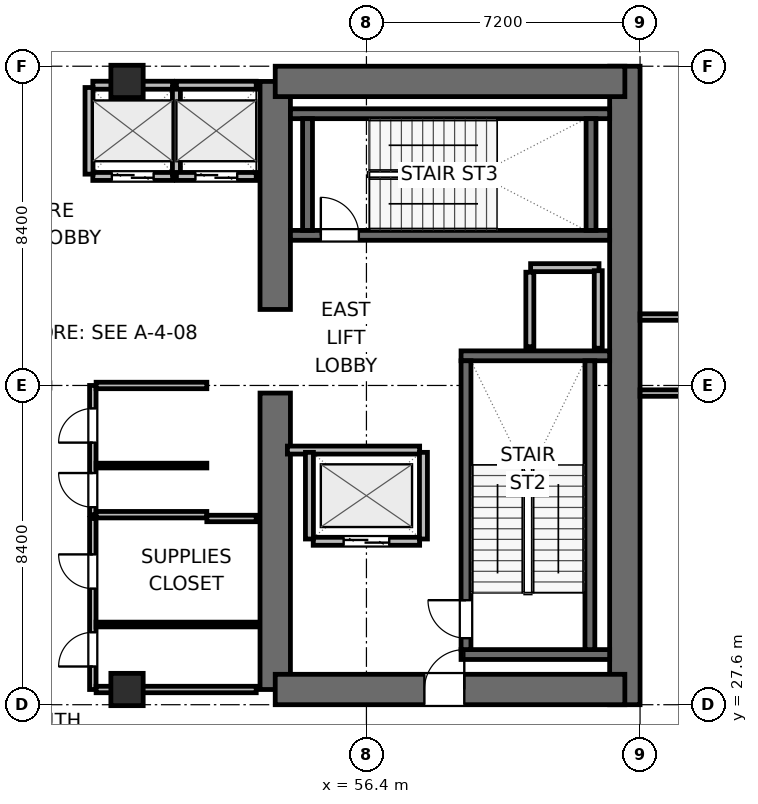
"""IFC4 building model, lengths in metres.
Left out: names, types, materials, properties, quantities, classifications, styles, units other than length and angle.
Written with IfcOpenShell. Run it as: python <this file> out.ifc"""

import sys

from ifc_helpers import new_model, si_unit, direction, frame, frame_2d, origin, origin_2d, place, context, subcontext, project, spatial, rectangle, extrude, element, fill, save


model = new_model("IFC4")
c1 = context("Model", 3, precision=1e-05, world=origin(), true_north=direction((0.0, 1.0)))
c2 = subcontext(c1, "Body", "Model", "MODEL_VIEW")
j1 = project(units=[si_unit("LENGTHUNIT", "METRE"), si_unit("PLANEANGLEUNIT", "RADIAN")], contexts=[c1])
p1 = place(None, origin())
s1 = spatial("IfcSite", under=j1, at=p1, CompositionType="ELEMENT")
p2 = place(p1, origin())
s2 = spatial("IfcBuilding", under=s1, at=p2, CompositionType="ELEMENT")
p3 = place(p2, frame((0.0, 0.0, 125.4)))
s3 = spatial("IfcBuildingStorey", under=s2, at=p3, CompositionType="ELEMENT", Elevation=125.4)
p4 = place(p3, frame((54.0, 28.0, 0.0), z_axis=(0.0, 0.0, 1.0), x_axis=(0.0, 1.0, 0.0)))
e1 = element("IfcWall", 1, at=p4, inside=s3, PredefinedType="SHEAR", context=c2, shape_type="SweptSolid", body=[
    extrude(rectangle(XDim=7.8, YDim=0.8, at=frame_2d((3.9, 0.0))), origin(), (0.0, 0.0, 1.0), 4.5),
])
p5 = place(p3, frame((54.0, 38.0, 0.0), z_axis=(0.0, 0.0, 1.0), x_axis=(0.0, 1.0, 0.0)))
e2 = element("IfcWall", 2, at=p5, inside=s3, PredefinedType="SHEAR", context=c2, shape_type="SweptSolid", body=[
    extrude(rectangle(XDim=6.0, YDim=0.8, at=frame_2d((3.0, 0.0))), origin(), (0.0, 0.0, 1.0), 4.5),
])
p6 = place(p3, frame((63.2, 27.6, 0.0), z_axis=(0.0, 0.0, 1.0), x_axis=(0.0, 1.0, 0.0)))
e3 = element("IfcWall", 3, at=p6, inside=s3, PredefinedType="SHEAR", context=c2, shape_type="SweptSolid", body=[
    extrude(rectangle(XDim=16.8, YDim=0.8, at=frame_2d((8.4, 0.0))), origin(), (0.0, 0.0, 1.0), 4.5),
])
p7 = place(p3, frame((54.0, 28.0, 0.0), z_axis=(0.0, 0.0, 1.0), x_axis=(1.0, 0.0, 0.0)))
e4 = element("IfcWall", 4, at=p7, inside=s3, PredefinedType="SHEAR", context=c2, shape_type="SweptSolid", body=[
    extrude(rectangle(XDim=9.2, YDim=0.8, at=frame_2d((4.6, 0.0))), origin(), (0.0, 0.0, 1.0), 4.5),
])
p8 = place(p7, frame((3.925, 0.0, 0.0)))
e5 = element("IfcOpeningElement", 5, at=p8, cuts=e4, PredefinedType="OPENING", context=c2, shape_type="SweptSolid", body=[
    extrude(rectangle(XDim=1.05, YDim=2.04, at=frame_2d((0.525, 1.02))), frame((0.0, 0.41, 0.0), z_axis=(0.0, -1.0, 0.0), x_axis=(1.0, 0.0, 0.0)), (0.0, 0.0, 1.0), 0.82),
])
p9 = place(p3, frame((54.0, 44.0, 0.0), z_axis=(0.0, 0.0, 1.0), x_axis=(1.0, 0.0, 0.0)))
e6 = element("IfcWall", 6, at=p9, inside=s3, PredefinedType="SHEAR", context=c2, shape_type="SweptSolid", body=[
    extrude(rectangle(XDim=9.2, YDim=0.8, at=frame_2d((4.6, 0.0))), origin(), (0.0, 0.0, 1.0), 4.5),
])
for number, where, z_axis, x_axis in (
    (7, (58.89, 28.92, 0.0), (0.0, 0.0, 1.0), (1.0, 0.0, 0.0)),
    (8, (58.89, 36.78, 0.0), (0.0, 0.0, 1.0), (1.0, 0.0, 0.0)),
):
    element("IfcWall", number, at=place(p3, frame(where, z_axis=z_axis, x_axis=x_axis)), inside=s3, PredefinedType="SHEAR", context=c2, shape_type="SweptSolid", body=[
        extrude(rectangle(XDim=3.91, YDim=0.26, at=frame_2d((1.955, 0.0))), origin(), (0.0, 0.0, 1.0), 4.5),
    ])
p10 = place(p3, frame((59.02, 29.05, 0.0), z_axis=(0.0, 0.0, 1.0), x_axis=(0.0, 1.0, 0.0)))
e9 = element("IfcWall", 9, at=p10, inside=s3, PredefinedType="SHEAR", context=c2, shape_type="SweptSolid", body=[
    extrude(rectangle(XDim=7.6, YDim=0.26, at=frame_2d((3.8, 0.0))), origin(), (0.0, 0.0, 1.0), 4.5),
])
p11 = place(p10, frame((0.3, 0.0, 0.0)))
e10 = element("IfcOpeningElement", 10, at=p11, cuts=e9, PredefinedType="OPENING", context=c2, shape_type="SweptSolid", body=[
    extrude(rectangle(XDim=1.0, YDim=2.04, at=frame_2d((0.5, 1.02))), frame((0.0, 0.14, 0.0), z_axis=(0.0, -1.0, 0.0), x_axis=(1.0, 0.0, 0.0)), (0.0, 0.0, 1.0), 0.28),
])
p12 = place(p3, frame((62.28, 29.05, 0.0), z_axis=(0.0, 0.0, 1.0), x_axis=(0.0, 1.0, 0.0)))
e11 = element("IfcWall", 11, at=p12, inside=s3, PredefinedType="SHEAR", context=c2, shape_type="SweptSolid", body=[
    extrude(rectangle(XDim=7.6, YDim=0.26, at=frame_2d((3.8, 0.0))), origin(), (0.0, 0.0, 1.0), 4.5),
])
p13 = place(p3, frame((54.4, 39.95, 0.0), z_axis=(0.0, 0.0, 1.0), x_axis=(1.0, 0.0, 0.0)))
e12 = element("IfcWall", 12, at=p13, inside=s3, PredefinedType="SHEAR", context=c2, shape_type="SweptSolid", body=[
    extrude(rectangle(XDim=8.4, YDim=0.26, at=frame_2d((4.2, 0.0))), origin(), (0.0, 0.0, 1.0), 4.5),
])
p14 = place(p13, frame((0.8, 0.0, 0.0)))
e13 = element("IfcOpeningElement", 13, at=p14, cuts=e12, PredefinedType="OPENING", context=c2, shape_type="SweptSolid", body=[
    extrude(rectangle(XDim=1.0, YDim=2.04, at=frame_2d((0.5, 1.02))), frame((0.0, 0.14, 0.0), z_axis=(0.0, -1.0, 0.0), x_axis=(1.0, 0.0, 0.0)), (0.0, 0.0, 1.0), 0.28),
])
p15 = place(p3, frame((54.4, 43.15, 0.0), z_axis=(0.0, 0.0, 1.0), x_axis=(1.0, 0.0, 0.0)))
e14 = element("IfcWall", 14, at=p15, inside=s3, PredefinedType="SHEAR", context=c2, shape_type="SweptSolid", body=[
    extrude(rectangle(XDim=8.4, YDim=0.26, at=frame_2d((4.2, 0.0))), origin(), (0.0, 0.0, 1.0), 4.5),
])
for number, where, z_axis, x_axis in (
    (15, (54.85, 40.08, 0.0), (0.0, 0.0, 1.0), (0.0, 1.0, 0.0)),
    (16, (62.31, 40.08, 0.0), (0.0, 0.0, 1.0), (0.0, 1.0, 0.0)),
):
    element("IfcWall", number, at=place(p3, frame(where, z_axis=z_axis, x_axis=x_axis)), inside=s3, PredefinedType="SHEAR", context=c2, shape_type="SweptSolid", body=[
        extrude(rectangle(XDim=2.94, YDim=0.26, at=frame_2d((1.47, 0.0))), origin(), (0.0, 0.0, 1.0), 4.5),
    ])
for number, where, z_axis, x_axis in (
    (17, (50.1, 28.0, 0.0), (0.0, 0.0, 1.0), (1.0, 0.0, 0.0)),
    (18, (50.1, 44.0, 0.0), (0.0, 0.0, 1.0), (1.0, 0.0, 0.0)),
):
    element("IfcColumn", number, at=place(p3, frame(where, z_axis=z_axis, x_axis=x_axis)), inside=s3, PredefinedType="COLUMN", context=c2, shape_type="SweptSolid", body=[
        extrude(rectangle(XDim=0.85, YDim=0.85, at=origin_2d()), origin(), (0.0, 0.0, 1.0), 4.5),
    ])
p16 = place(p3, frame((60.72, 39.1, 0.0), z_axis=(0.0, 0.0, 1.0), x_axis=(1.0, 0.0, 0.0)))
e19 = element("IfcWall", 19, at=p16, inside=s3, PredefinedType="PARTITIONING", context=c2, shape_type="SweptSolid", body=[
    extrude(rectangle(XDim=1.8, YDim=0.21, at=frame_2d((0.9, 0.0))), origin(), (0.0, 0.0, 1.0), 4.24),
])
p17 = place(p3, frame((60.7, 37.02, 0.0), z_axis=(0.0, 0.0, 1.0), x_axis=(0.0, 1.0, 0.0)))
e20 = element("IfcWall", 20, at=p17, inside=s3, PredefinedType="PARTITIONING", context=c2, shape_type="SweptSolid", body=[
    extrude(rectangle(XDim=1.96, YDim=0.21, at=frame_2d((0.98, 0.0))), origin(), (0.0, 0.0, 1.0), 4.24),
])
p18 = place(p3, frame((62.5, 36.98, 0.0), z_axis=(0.0, 0.0, 1.0), x_axis=(0.0, 1.0, 0.0)))
e21 = element("IfcWall", 21, at=p18, inside=s3, PredefinedType="PARTITIONING", context=c2, shape_type="SweptSolid", body=[
    extrude(rectangle(XDim=2.04, YDim=0.21, at=frame_2d((1.02, 0.0))), origin(), (0.0, 0.0, 1.0), 4.24),
])
p19 = place(p3, frame((55.0, 31.9, 0.0), z_axis=(0.0, 0.0, 1.0), x_axis=(1.0, 0.0, 0.0)))
e22 = element("IfcWall", 22, at=p19, inside=s3, PredefinedType="PARTITIONING", context=c2, shape_type="SweptSolid", body=[
    extrude(rectangle(XDim=2.8, YDim=0.21, at=frame_2d((1.4, 0.0))), origin(), (0.0, 0.0, 1.0), 4.24),
])
p20 = place(p19, frame((0.8, 0.0, 0.0)))
e23 = element("IfcOpeningElement", 23, at=p20, cuts=e22, PredefinedType="OPENING", context=c2, shape_type="SweptSolid", body=[
    extrude(rectangle(XDim=1.2, YDim=2.04, at=frame_2d((0.6, 1.02))), frame((0.0, 0.115, 0.0), z_axis=(0.0, -1.0, 0.0), x_axis=(1.0, 0.0, 0.0)), (0.0, 0.0, 1.0), 0.23),
])
p21 = place(p3, frame((54.32, 34.3, 0.0), z_axis=(0.0, 0.0, 1.0), x_axis=(1.0, 0.0, 0.0)))
e24 = element("IfcWall", 24, at=p21, inside=s3, PredefinedType="PARTITIONING", context=c2, shape_type="SweptSolid", body=[
    extrude(rectangle(XDim=3.48, YDim=0.21, at=frame_2d((1.74, 0.0))), origin(), (0.0, 0.0, 1.0), 4.24),
])
for number, where, z_axis, x_axis in (
    (25, (54.9, 31.96, 0.0), (0.0, 0.0, 1.0), (0.0, 1.0, 0.0)),
    (26, (57.9, 31.96, 0.0), (0.0, 0.0, 1.0), (0.0, 1.0, 0.0)),
):
    element("IfcWall", number, at=place(p3, frame(where, z_axis=z_axis, x_axis=x_axis)), inside=s3, PredefinedType="PARTITIONING", context=c2, shape_type="SweptSolid", body=[
        extrude(rectangle(XDim=2.28, YDim=0.21, at=frame_2d((1.14, 0.0))), origin(), (0.0, 0.0, 1.0), 4.24),
    ])
p22 = place(p3, frame((49.2, 41.5, 0.0), z_axis=(0.0, 0.0, 1.0), x_axis=(1.0, 0.0, 0.0)))
e27 = element("IfcWall", 27, at=p22, inside=s3, PredefinedType="PARTITIONING", context=c2, shape_type="SweptSolid", body=[
    extrude(rectangle(XDim=2.1, YDim=0.21, at=frame_2d((1.05, 0.0))), origin(), (0.0, 0.0, 1.0), 4.24),
])
p23 = place(p22, frame((0.5, 0.0, 0.0)))
e28 = element("IfcOpeningElement", 28, at=p23, cuts=e27, PredefinedType="OPENING", context=c2, shape_type="SweptSolid", body=[
    extrude(rectangle(XDim=1.1, YDim=2.04, at=frame_2d((0.55, 1.02))), frame((0.0, 0.115, 0.0), z_axis=(0.0, -1.0, 0.0), x_axis=(1.0, 0.0, 0.0)), (0.0, 0.0, 1.0), 0.23),
])
p24 = place(p3, frame((49.2, 43.9, 0.0), z_axis=(0.0, 0.0, 1.0), x_axis=(1.0, 0.0, 0.0)))
e29 = element("IfcWall", 29, at=p24, inside=s3, PredefinedType="PARTITIONING", context=c2, shape_type="SweptSolid", body=[
    extrude(rectangle(XDim=2.1, YDim=0.21, at=frame_2d((1.05, 0.0))), origin(), (0.0, 0.0, 1.0), 3.125),
])
for number, where, z_axis, x_axis in (
    (30, (49.1, 41.56, 0.0), (0.0, 0.0, 1.0), (0.0, 1.0, 0.0)),
    (31, (51.4, 41.56, 0.0), (0.0, 0.0, 1.0), (0.0, 1.0, 0.0)),
):
    element("IfcWall", number, at=place(p3, frame(where, z_axis=z_axis, x_axis=x_axis)), inside=s3, PredefinedType="PARTITIONING", context=c2, shape_type="SweptSolid", body=[
        extrude(rectangle(XDim=2.28, YDim=0.21, at=frame_2d((1.14, 0.0))), origin(), (0.0, 0.0, 1.0), 4.24),
    ])
p25 = place(p3, frame((51.4, 41.5, 0.0), z_axis=(0.0, 0.0, 1.0), x_axis=(1.0, 0.0, 0.0)))
e32 = element("IfcWall", 32, at=p25, inside=s3, PredefinedType="PARTITIONING", context=c2, shape_type="SweptSolid", body=[
    extrude(rectangle(XDim=2.1, YDim=0.21, at=frame_2d((1.05, 0.0))), origin(), (0.0, 0.0, 1.0), 4.24),
])
p26 = place(p25, frame((0.5, 0.0, 0.0)))
e33 = element("IfcOpeningElement", 33, at=p26, cuts=e32, PredefinedType="OPENING", context=c2, shape_type="SweptSolid", body=[
    extrude(rectangle(XDim=1.1, YDim=2.04, at=frame_2d((0.55, 1.02))), frame((0.0, 0.115, 0.0), z_axis=(0.0, -1.0, 0.0), x_axis=(1.0, 0.0, 0.0)), (0.0, 0.0, 1.0), 0.23),
])
p27 = place(p3, frame((51.4, 43.9, 0.0), z_axis=(0.0, 0.0, 1.0), x_axis=(1.0, 0.0, 0.0)))
e34 = element("IfcWall", 34, at=p27, inside=s3, PredefinedType="PARTITIONING", context=c2, shape_type="SweptSolid", body=[
    extrude(rectangle(XDim=2.1, YDim=0.21, at=frame_2d((1.05, 0.0))), origin(), (0.0, 0.0, 1.0), 3.125),
])
p28 = place(p3, frame((49.2, 32.6, 0.0), z_axis=(0.0, 0.0, 1.0), x_axis=(0.0, 1.0, 0.0)))
e35 = element("IfcWall", 35, at=p28, inside=s3, PredefinedType="PARTITIONING", context=c2, shape_type="SweptSolid", body=[
    extrude(rectangle(XDim=3.4, YDim=0.17, at=frame_2d((1.7, 0.0))), origin(), (0.0, 0.0, 1.0), 4.24),
])
p29 = place(p28, frame((0.196, 0.0, 0.0)))
e36 = element("IfcOpeningElement", 36, at=p29, cuts=e35, PredefinedType="OPENING", context=c2, shape_type="SweptSolid", body=[
    extrude(rectangle(XDim=0.9, YDim=2.02, at=frame_2d((0.45, 1.01))), frame((0.0, 0.095, 0.0), z_axis=(0.0, -1.0, 0.0), x_axis=(1.0, 0.0, 0.0)), (0.0, 0.0, 1.0), 0.19),
])
p30 = place(p28, frame((1.896, 0.0, 0.0)))
e37 = element("IfcOpeningElement", 37, at=p30, cuts=e35, PredefinedType="OPENING", context=c2, shape_type="SweptSolid", body=[
    extrude(rectangle(XDim=0.9, YDim=2.02, at=frame_2d((0.45, 1.01))), frame((0.0, 0.095, 0.0), z_axis=(0.0, -1.0, 0.0), x_axis=(1.0, 0.0, 0.0)), (0.0, 0.0, 1.0), 0.19),
])
for number, where, z_axis, x_axis in (
    (38, (49.287, 32.6, 0.0), (0.0, 0.0, 1.0), (1.0, 0.0, 0.0)),
    (39, (49.287, 36.0, 0.0), (0.0, 0.0, 1.0), (1.0, 0.0, 0.0)),
):
    element("IfcWall", number, at=place(p3, frame(where, z_axis=z_axis, x_axis=x_axis)), inside=s3, PredefinedType="PARTITIONING", context=c2, shape_type="SweptSolid", body=[
        extrude(rectangle(XDim=2.913, YDim=0.17, at=frame_2d((1.457, 0.0))), origin(), (0.0, 0.0, 1.0), 4.24),
    ])
p31 = place(p3, frame((49.287, 33.892, 0.0), z_axis=(0.0, 0.0, 1.0), x_axis=(1.0, 0.0, 0.0)))
e40 = element("IfcWall", 40, at=p31, inside=s3, PredefinedType="PARTITIONING", context=c2, shape_type="SweptSolid", body=[
    extrude(rectangle(XDim=2.913, YDim=0.125, at=frame_2d((1.457, 0.0))), origin(), (0.0, 0.0, 1.0), 4.24),
])
p32 = place(p3, frame((49.2, 28.0, 0.0), z_axis=(0.0, 0.0, 1.0), x_axis=(0.0, 1.0, 0.0)))
e41 = element("IfcWall", 41, at=p32, inside=s3, PredefinedType="PARTITIONING", context=c2, shape_type="SweptSolid", body=[
    extrude(rectangle(XDim=4.5, YDim=0.17, at=frame_2d((2.25, 0.0))), origin(), (0.0, 0.0, 1.0), 4.24),
])
p33 = place(p32, frame((0.605, 0.0, 0.0)))
e42 = element("IfcOpeningElement", 42, at=p33, cuts=e41, PredefinedType="OPENING", context=c2, shape_type="SweptSolid", body=[
    extrude(rectangle(XDim=0.9, YDim=2.02, at=frame_2d((0.45, 1.01))), frame((0.0, 0.095, 0.0), z_axis=(0.0, -1.0, 0.0), x_axis=(1.0, 0.0, 0.0)), (0.0, 0.0, 1.0), 0.19),
])
p34 = place(p32, frame((2.655, 0.0, 0.0)))
e43 = element("IfcOpeningElement", 43, at=p34, cuts=e41, PredefinedType="OPENING", context=c2, shape_type="SweptSolid", body=[
    extrude(rectangle(XDim=0.9, YDim=2.02, at=frame_2d((0.45, 1.01))), frame((0.0, 0.095, 0.0), z_axis=(0.0, -1.0, 0.0), x_axis=(1.0, 0.0, 0.0)), (0.0, 0.0, 1.0), 0.19),
])
p35 = place(p3, frame((49.287, 28.0, 0.0), z_axis=(0.0, 0.0, 1.0), x_axis=(1.0, 0.0, 0.0)))
e44 = element("IfcWall", 44, at=p35, inside=s3, PredefinedType="PARTITIONING", context=c2, shape_type="SweptSolid", body=[
    extrude(rectangle(XDim=4.213, YDim=0.17, at=frame_2d((2.106, 0.0))), origin(), (0.0, 0.0, 1.0), 3.125),
])
p36 = place(p3, frame((52.2, 32.5, 0.0), z_axis=(0.0, 0.0, 1.0), x_axis=(1.0, 0.0, 0.0)))
e45 = element("IfcWall", 45, at=p36, inside=s3, PredefinedType="PARTITIONING", context=c2, shape_type="SweptSolid", body=[
    extrude(rectangle(XDim=1.3, YDim=0.17, at=frame_2d((0.65, 0.0))), origin(), (0.0, 0.0, 1.0), 4.24),
])
p37 = place(p3, frame((49.287, 29.71, 0.0), z_axis=(0.0, 0.0, 1.0), x_axis=(1.0, 0.0, 0.0)))
e46 = element("IfcWall", 46, at=p37, inside=s3, PredefinedType="PARTITIONING", context=c2, shape_type="SweptSolid", body=[
    extrude(rectangle(XDim=4.213, YDim=0.125, at=frame_2d((2.106, 0.0))), origin(), (0.0, 0.0, 1.0), 4.24),
])
p38 = place(p3, frame((63.6, 35.8, 0.0), z_axis=(0.0, 0.0, 1.0), x_axis=(1.0, 0.0, 0.0)))
e47 = element("IfcWall", 47, at=p38, inside=s3, PredefinedType="PARTITIONING", context=c2, shape_type="SweptSolid", body=[
    extrude(rectangle(XDim=6.885, YDim=0.17, at=frame_2d((3.442, 0.0))), origin(), (0.0, 0.0, 1.0), 3.603),
])
p39 = place(p38, frame((1.1, 0.0, 0.0)))
e48 = element("IfcOpeningElement", 48, at=p39, cuts=e47, PredefinedType="OPENING", context=c2, shape_type="SweptSolid", body=[
    extrude(rectangle(XDim=0.95, YDim=2.04, at=frame_2d((0.475, 1.02))), frame((0.0, 0.095, 0.0), z_axis=(0.0, -1.0, 0.0), x_axis=(1.0, 0.0, 0.0)), (0.0, 0.0, 1.0), 0.19),
])
p40 = place(p3, frame((63.6, 37.8, 0.0), z_axis=(0.0, 0.0, 1.0), x_axis=(1.0, 0.0, 0.0)))
e49 = element("IfcWall", 49, at=p40, inside=s3, PredefinedType="PARTITIONING", context=c2, shape_type="SweptSolid", body=[
    extrude(rectangle(XDim=4.94, YDim=0.17, at=frame_2d((2.47, 0.0))), origin(), (0.0, 0.0, 1.0), 4.24),
])
p41 = place(p40, frame((1.1, 0.0, 0.0)))
e50 = element("IfcOpeningElement", 50, at=p41, cuts=e49, PredefinedType="OPENING", context=c2, shape_type="SweptSolid", body=[
    extrude(rectangle(XDim=0.95, YDim=2.04, at=frame_2d((0.475, 1.02))), frame((0.0, 0.095, 0.0), z_axis=(0.0, -1.0, 0.0), x_axis=(1.0, 0.0, 0.0)), (0.0, 0.0, 1.0), 0.19),
])
p42 = place(p11, origin())
e51 = element("IfcDoor", 51, at=p42, inside=s3, OperationType="SINGLE_SWING_RIGHT", PredefinedType="DOOR", context=c2, shape_type="SweptSolid", body=[
    extrude(rectangle(XDim=1.0, YDim=2.04, at=frame_2d((0.5, 1.02))), frame((0.0, 0.025, 0.0), z_axis=(0.0, -1.0, 0.0), x_axis=(1.0, 0.0, 0.0)), (0.0, 0.0, 1.0), 0.05),
])
fill(e10, e51)
p43 = place(p14, origin())
e52 = element("IfcDoor", 52, at=p43, inside=s3, OperationType="SINGLE_SWING_LEFT", PredefinedType="DOOR", context=c2, shape_type="SweptSolid", body=[
    extrude(rectangle(XDim=1.0, YDim=2.04, at=frame_2d((0.5, 1.02))), frame((0.0, 0.025, 0.0), z_axis=(0.0, -1.0, 0.0), x_axis=(1.0, 0.0, 0.0)), (0.0, 0.0, 1.0), 0.05),
])
fill(e13, e52)
p44 = place(p20, origin())
e53 = element("IfcDoor", 53, at=p44, inside=s3, OperationType="DOUBLE_DOOR_SLIDING", PredefinedType="DOOR", context=c2, shape_type="SweptSolid", body=[
    extrude(rectangle(XDim=1.2, YDim=2.04, at=frame_2d((0.6, 1.02))), frame((0.0, 0.025, 0.0), z_axis=(0.0, -1.0, 0.0), x_axis=(1.0, 0.0, 0.0)), (0.0, 0.0, 1.0), 0.05),
])
fill(e23, e53)
p45 = place(p23, origin())
e54 = element("IfcDoor", 54, at=p45, inside=s3, OperationType="DOUBLE_DOOR_SLIDING", PredefinedType="DOOR", context=c2, shape_type="SweptSolid", body=[
    extrude(rectangle(XDim=1.1, YDim=2.04, at=frame_2d((0.55, 1.02))), frame((0.0, 0.025, 0.0), z_axis=(0.0, -1.0, 0.0), x_axis=(1.0, 0.0, 0.0)), (0.0, 0.0, 1.0), 0.05),
])
fill(e28, e54)
p46 = place(p26, origin())
e55 = element("IfcDoor", 55, at=p46, inside=s3, OperationType="DOUBLE_DOOR_SLIDING", PredefinedType="DOOR", context=c2, shape_type="SweptSolid", body=[
    extrude(rectangle(XDim=1.1, YDim=2.04, at=frame_2d((0.55, 1.02))), frame((0.0, 0.025, 0.0), z_axis=(0.0, -1.0, 0.0), x_axis=(1.0, 0.0, 0.0)), (0.0, 0.0, 1.0), 0.05),
])
fill(e33, e55)
p47 = place(p8, origin())
e56 = element("IfcDoor", 56, at=p47, inside=s3, OperationType="SINGLE_SWING_RIGHT", PredefinedType="DOOR", context=c2, shape_type="SweptSolid", body=[
    extrude(rectangle(XDim=1.05, YDim=2.04, at=frame_2d((0.525, 1.02))), frame((0.0, 0.025, 0.0), z_axis=(0.0, -1.0, 0.0), x_axis=(1.0, 0.0, 0.0)), (0.0, 0.0, 1.0), 0.05),
])
fill(e5, e56)
p48 = place(p29, origin())
e57 = element("IfcDoor", 57, at=p48, inside=s3, OperationType="SINGLE_SWING_RIGHT", PredefinedType="DOOR", context=c2, shape_type="SweptSolid", body=[
    extrude(rectangle(XDim=0.9, YDim=2.02, at=frame_2d((0.45, 1.01))), frame((0.0, 0.025, 0.0), z_axis=(0.0, -1.0, 0.0), x_axis=(1.0, 0.0, 0.0)), (0.0, 0.0, 1.0), 0.05),
])
fill(e36, e57)
p49 = place(p30, origin())
e58 = element("IfcDoor", 58, at=p49, inside=s3, OperationType="SINGLE_SWING_LEFT", PredefinedType="DOOR", context=c2, shape_type="SweptSolid", body=[
    extrude(rectangle(XDim=0.9, YDim=2.02, at=frame_2d((0.45, 1.01))), frame((0.0, 0.025, 0.0), z_axis=(0.0, -1.0, 0.0), x_axis=(1.0, 0.0, 0.0)), (0.0, 0.0, 1.0), 0.05),
])
fill(e37, e58)
p50 = place(p33, origin())
e59 = element("IfcDoor", 59, at=p50, inside=s3, OperationType="SINGLE_SWING_LEFT", PredefinedType="DOOR", context=c2, shape_type="SweptSolid", body=[
    extrude(rectangle(XDim=0.9, YDim=2.02, at=frame_2d((0.45, 1.01))), frame((0.0, 0.025, 0.0), z_axis=(0.0, -1.0, 0.0), x_axis=(1.0, 0.0, 0.0)), (0.0, 0.0, 1.0), 0.05),
])
fill(e42, e59)
p51 = place(p34, origin())
e60 = element("IfcDoor", 60, at=p51, inside=s3, OperationType="SINGLE_SWING_RIGHT", PredefinedType="DOOR", context=c2, shape_type="SweptSolid", body=[
    extrude(rectangle(XDim=0.9, YDim=2.02, at=frame_2d((0.45, 1.01))), frame((0.0, 0.025, 0.0), z_axis=(0.0, -1.0, 0.0), x_axis=(1.0, 0.0, 0.0)), (0.0, 0.0, 1.0), 0.05),
])
fill(e43, e60)
save(model, sys.argv[1])
